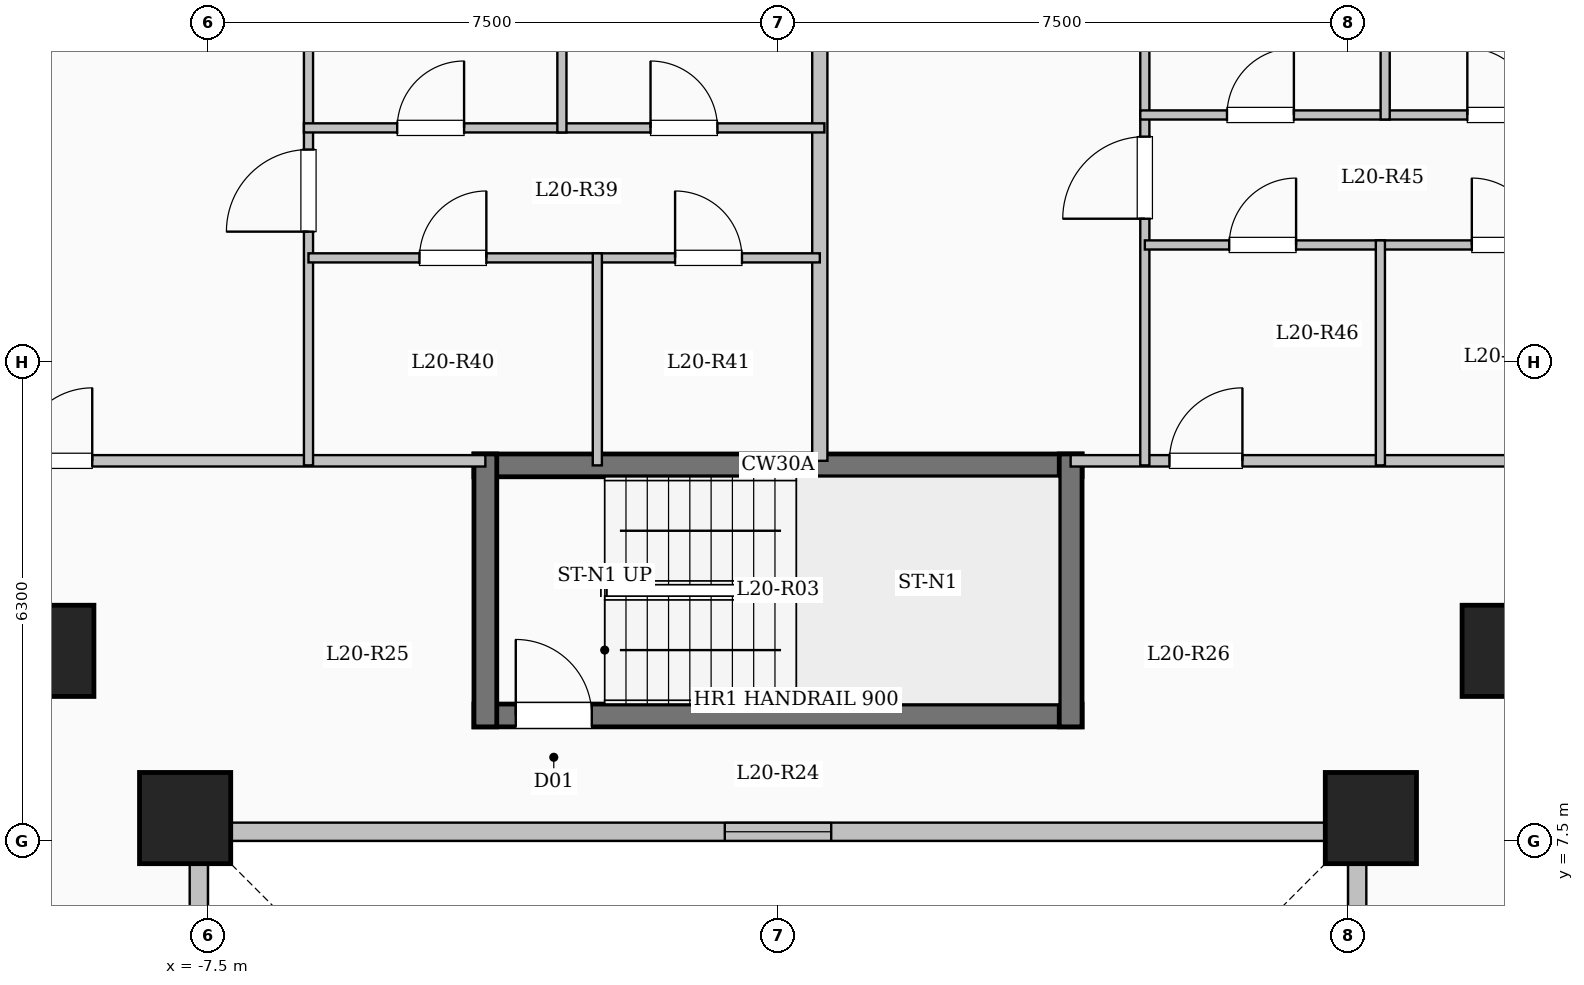
"""IFC4 building model, lengths in metres.
Left out: names, types, materials, properties, quantities, classifications, styles, units other than length and angle.
Written with IfcOpenShell. Run it as: python <this file> out.ifc"""

import sys

from ifc_helpers import new_model, si_unit, direction, frame, frame_2d, origin, origin_2d, place, context, subcontext, project, spatial, rectangle, extrude, element, fill, save


model = new_model("IFC4")
c1 = context("Model", 3, precision=1e-05, world=origin(), true_north=direction((0.0, 1.0)))
c2 = subcontext(c1, "Body", "Model", "MODEL_VIEW")
j1 = project(units=[si_unit("LENGTHUNIT", "METRE"), si_unit("PLANEANGLEUNIT", "RADIAN")], contexts=[c1])
p1 = place(None, origin())
s1 = spatial("IfcSite", under=j1, at=p1, CompositionType="ELEMENT")
p2 = place(p1, origin())
s2 = spatial("IfcBuilding", under=s1, at=p2, CompositionType="ELEMENT")
p3 = place(p2, frame((0.0, 0.0, 78.3)))
s3 = spatial("IfcBuildingStorey", under=s2, at=p3, CompositionType="ELEMENT", Elevation=78.3)
for number, where, z_axis, x_axis in (
    (1, (-7.8, 7.8, 0.0), (0.0, 0.0, 1.0), (1.0, 0.0, 0.0)),
    (2, (7.8, 7.8, 0.0), (0.0, 0.0, 1.0), (1.0, 0.0, 0.0)),
    (3, (-9.6, 10.0, 0.0), (0.0, 0.0, 1.0), (1.0, 0.0, 0.0)),
    (4, (9.6, 10.0, 0.0), (0.0, 0.0, 1.0), (1.0, 0.0, 0.0)),
):
    element("IfcColumn", number, at=place(p3, frame(where, z_axis=z_axis, x_axis=x_axis)), inside=s3, PredefinedType="COLUMN", context=c2, shape_type="SweptSolid", body=[
        extrude(rectangle(XDim=1.2, YDim=1.2, at=origin_2d()), origin(), (0.0, 0.0, 1.0), 3.35),
    ])
p4 = place(p3, frame((7.62, -7.62, 0.0), z_axis=(0.0, 0.0, 1.0), x_axis=(0.0, 1.0, 0.0)))
e5 = element("IfcWall", 5, at=p4, inside=s3, PredefinedType="SOLIDWALL", context=c2, shape_type="SweptSolid", body=[
    extrude(rectangle(XDim=15.24, YDim=0.24, at=frame_2d((7.62, 0.0))), origin(), (0.0, 0.0, 1.0), 3.1),
])
p5 = place(p4, frame((6.92, 0.0, 0.95)))
e6 = element("IfcOpeningElement", 6, at=p5, cuts=e5, PredefinedType="OPENING", context=c2, shape_type="SweptSolid", body=[
    extrude(rectangle(XDim=1.4, YDim=1.5, at=frame_2d((0.7, 0.75))), frame((0.0, 0.13, 0.0), z_axis=(0.0, -1.0, 0.0), x_axis=(1.0, 0.0, 0.0)), (0.0, 0.0, 1.0), 0.26),
])
p6 = place(p3, frame((7.62, 7.62, 0.0), z_axis=(0.0, 0.0, 1.0), x_axis=(-1.0, 0.0, 0.0)))
e7 = element("IfcWall", 7, at=p6, inside=s3, PredefinedType="SOLIDWALL", context=c2, shape_type="SweptSolid", body=[
    extrude(rectangle(XDim=15.24, YDim=0.24, at=frame_2d((7.62, 0.0))), origin(), (0.0, 0.0, 1.0), 3.1),
])
p7 = place(p6, frame((6.92, 0.0, 0.95)))
e8 = element("IfcOpeningElement", 8, at=p7, cuts=e7, PredefinedType="OPENING", context=c2, shape_type="SweptSolid", body=[
    extrude(rectangle(XDim=1.4, YDim=1.5, at=frame_2d((0.7, 0.75))), frame((0.0, 0.13, 0.0), z_axis=(0.0, -1.0, 0.0), x_axis=(1.0, 0.0, 0.0)), (0.0, 0.0, 1.0), 0.26),
])
p8 = place(p3, frame((-7.62, 7.62, 0.0), z_axis=(0.0, 0.0, 1.0), x_axis=(0.0, -1.0, 0.0)))
e9 = element("IfcWall", 9, at=p8, inside=s3, PredefinedType="SOLIDWALL", context=c2, shape_type="SweptSolid", body=[
    extrude(rectangle(XDim=15.24, YDim=0.24, at=frame_2d((7.62, 0.0))), origin(), (0.0, 0.0, 1.0), 3.1),
])
p9 = place(p8, frame((6.92, 0.0, 0.95)))
e10 = element("IfcOpeningElement", 10, at=p9, cuts=e9, PredefinedType="OPENING", context=c2, shape_type="SweptSolid", body=[
    extrude(rectangle(XDim=1.4, YDim=1.5, at=frame_2d((0.7, 0.75))), frame((0.0, 0.13, 0.0), z_axis=(0.0, -1.0, 0.0), x_axis=(1.0, 0.0, 0.0)), (0.0, 0.0, 1.0), 0.26),
])
p10 = place(p3, frame((-4.0, 12.44, 0.0), z_axis=(0.0, 0.0, 1.0), x_axis=(1.0, 0.0, 0.0)))
e11 = element("IfcWall", 11, at=p10, inside=s3, PredefinedType="SHEAR", context=c2, shape_type="SweptSolid", body=[
    extrude(rectangle(XDim=8.0, YDim=0.3, at=frame_2d((4.0, 0.0))), origin(), (0.0, 0.0, 1.0), 3.35),
])
p11 = place(p3, frame((-4.0, 9.15, 0.0), z_axis=(0.0, 0.0, 1.0), x_axis=(1.0, 0.0, 0.0)))
e12 = element("IfcWall", 12, at=p11, inside=s3, PredefinedType="SHEAR", context=c2, shape_type="SweptSolid", body=[
    extrude(rectangle(XDim=8.0, YDim=0.3, at=frame_2d((4.0, 0.0))), origin(), (0.0, 0.0, 1.0), 3.35),
])
p12 = place(p11, frame((0.55, 0.0, 0.0)))
e13 = element("IfcOpeningElement", 13, at=p12, cuts=e12, PredefinedType="OPENING", context=c2, shape_type="SweptSolid", body=[
    extrude(rectangle(XDim=1.0, YDim=2.15, at=frame_2d((0.5, 1.075))), frame((0.0, 0.16, 0.0), z_axis=(0.0, -1.0, 0.0), x_axis=(1.0, 0.0, 0.0)), (0.0, 0.0, 1.0), 0.32),
])
for number, where, z_axis, x_axis in (
    (14, (-3.85, 9.0, 0.0), (0.0, 0.0, 1.0), (0.0, 1.0, 0.0)),
    (15, (3.85, 9.0, 0.0), (0.0, 0.0, 1.0), (0.0, 1.0, 0.0)),
):
    element("IfcWall", number, at=place(p3, frame(where, z_axis=z_axis, x_axis=x_axis)), inside=s3, PredefinedType="SHEAR", context=c2, shape_type="SweptSolid", body=[
        extrude(rectangle(XDim=3.59, YDim=0.3, at=frame_2d((1.795, 0.0))), origin(), (0.0, 0.0, 1.0), 3.35),
    ])
p13 = place(p3, frame((-21.05, 12.5, 0.0), z_axis=(0.0, 0.0, 1.0), x_axis=(1.0, 0.0, 0.0)))
e16 = element("IfcWall", 16, at=p13, inside=s3, PredefinedType="PARTITIONING", context=c2, shape_type="SweptSolid", body=[
    extrude(rectangle(XDim=17.2, YDim=0.15, at=frame_2d((8.6, 0.0))), origin(), (0.0, 0.0, 1.0), 3.1),
])
p14 = place(p13, frame((0.7, 0.0, 0.0)))
e17 = element("IfcOpeningElement", 17, at=p14, cuts=e16, PredefinedType="OPENING", context=c2, shape_type="SweptSolid", body=[
    extrude(rectangle(XDim=0.96, YDim=2.15, at=frame_2d((0.48, 1.075))), frame((0.0, 0.085, 0.0), z_axis=(0.0, -1.0, 0.0), x_axis=(1.0, 0.0, 0.0)), (0.0, 0.0, 1.0), 0.17),
])
p15 = place(p13, frame((11.068, 0.0, 0.0)))
e18 = element("IfcOpeningElement", 18, at=p15, cuts=e16, PredefinedType="OPENING", context=c2, shape_type="SweptSolid", body=[
    extrude(rectangle(XDim=0.96, YDim=2.15, at=frame_2d((0.48, 1.075))), frame((0.0, 0.085, 0.0), z_axis=(0.0, -1.0, 0.0), x_axis=(1.0, 0.0, 0.0)), (0.0, 0.0, 1.0), 0.17),
])
p16 = place(p3, frame((3.85, 12.5, 0.0), z_axis=(0.0, 0.0, 1.0), x_axis=(1.0, 0.0, 0.0)))
e19 = element("IfcWall", 19, at=p16, inside=s3, PredefinedType="PARTITIONING", context=c2, shape_type="SweptSolid", body=[
    extrude(rectangle(XDim=17.2, YDim=0.15, at=frame_2d((8.6, 0.0))), origin(), (0.0, 0.0, 1.0), 3.1),
])
p17 = place(p16, frame((1.3, 0.0, 0.0)))
e20 = element("IfcOpeningElement", 20, at=p17, cuts=e19, PredefinedType="OPENING", context=c2, shape_type="SweptSolid", body=[
    extrude(rectangle(XDim=0.96, YDim=2.15, at=frame_2d((0.48, 1.075))), frame((0.0, 0.085, 0.0), z_axis=(0.0, -1.0, 0.0), x_axis=(1.0, 0.0, 0.0)), (0.0, 0.0, 1.0), 0.17),
])
p18 = place(p16, frame((8.06, 0.0, 0.0)))
e21 = element("IfcOpeningElement", 21, at=p18, cuts=e19, PredefinedType="OPENING", context=c2, shape_type="SweptSolid", body=[
    extrude(rectangle(XDim=0.96, YDim=2.15, at=frame_2d((0.48, 1.075))), frame((0.0, 0.085, 0.0), z_axis=(0.0, -1.0, 0.0), x_axis=(1.0, 0.0, 0.0)), (0.0, 0.0, 1.0), 0.17),
])
p19 = place(p3, frame((0.55, 12.5, 0.0), z_axis=(0.0, 0.0, 1.0), x_axis=(0.0, 1.0, 0.0)))
e22 = element("IfcWall", 22, at=p19, inside=s3, PredefinedType="SOLIDWALL", context=c2, shape_type="SweptSolid", body=[
    extrude(rectangle(XDim=11.08, YDim=0.2, at=frame_2d((5.54, 0.0))), origin(), (0.0, 0.0, 1.0), 3.1),
])
p20 = place(p3, frame((-6.177, 12.44, 0.0), z_axis=(0.0, 0.0, 1.0), x_axis=(0.0, 1.0, 0.0)))
e23 = element("IfcWall", 23, at=p20, inside=s3, PredefinedType="PARTITIONING", context=c2, shape_type="SweptSolid", body=[
    extrude(rectangle(XDim=10.85, YDim=0.12, at=frame_2d((5.425, 0.0))), origin(), (0.0, 0.0, 1.0), 3.1),
])
p21 = place(p20, frame((3.075, 0.0, 0.0)))
e24 = element("IfcOpeningElement", 24, at=p21, cuts=e23, PredefinedType="OPENING", context=c2, shape_type="SweptSolid", body=[
    extrude(rectangle(XDim=1.08, YDim=2.15, at=frame_2d((0.54, 1.075))), frame((0.0, 0.07, 0.0), z_axis=(0.0, -1.0, 0.0), x_axis=(1.0, 0.0, 0.0)), (0.0, 0.0, 1.0), 0.14),
])
p22 = place(p3, frame((-6.177, 15.17, 0.0), z_axis=(0.0, 0.0, 1.0), x_axis=(1.0, 0.0, 0.0)))
e25 = element("IfcWall", 25, at=p22, inside=s3, PredefinedType="PARTITIONING", context=c2, shape_type="SweptSolid", body=[
    extrude(rectangle(XDim=3.8, YDim=0.12, at=frame_2d((1.9, 0.0))), origin(), (0.0, 0.0, 1.0), 3.1),
])
p23 = place(p22, frame((1.46, 0.0, 0.0)))
e26 = element("IfcOpeningElement", 26, at=p23, cuts=e25, PredefinedType="OPENING", context=c2, shape_type="SweptSolid", body=[
    extrude(rectangle(XDim=0.88, YDim=2.1, at=frame_2d((0.44, 1.05))), frame((0.0, 0.07, 0.0), z_axis=(0.0, -1.0, 0.0), x_axis=(1.0, 0.0, 0.0)), (0.0, 0.0, 1.0), 0.14),
])
p24 = place(p3, frame((-2.377, 15.17, 0.0), z_axis=(0.0, 0.0, 1.0), x_axis=(1.0, 0.0, 0.0)))
e27 = element("IfcWall", 27, at=p24, inside=s3, PredefinedType="PARTITIONING", context=c2, shape_type="SweptSolid", body=[
    extrude(rectangle(XDim=2.927, YDim=0.12, at=frame_2d((1.463, 0.0))), origin(), (0.0, 0.0, 1.0), 3.1),
])
p25 = place(p24, frame((1.023, 0.0, 0.0)))
e28 = element("IfcOpeningElement", 28, at=p25, cuts=e27, PredefinedType="OPENING", context=c2, shape_type="SweptSolid", body=[
    extrude(rectangle(XDim=0.88, YDim=2.1, at=frame_2d((0.44, 1.05))), frame((0.0, 0.07, 0.0), z_axis=(0.0, -1.0, 0.0), x_axis=(1.0, 0.0, 0.0)), (0.0, 0.0, 1.0), 0.14),
])
p26 = place(p3, frame((-6.237, 16.88, 0.0), z_axis=(0.0, 0.0, 1.0), x_axis=(1.0, 0.0, 0.0)))
e29 = element("IfcWall", 29, at=p26, inside=s3, PredefinedType="PARTITIONING", context=c2, shape_type="SweptSolid", body=[
    extrude(rectangle(XDim=6.847, YDim=0.12, at=frame_2d((3.424, 0.0))), origin(), (0.0, 0.0, 1.0), 3.1),
])
p27 = place(p26, frame((1.227, 0.0, 0.0)))
e30 = element("IfcOpeningElement", 30, at=p27, cuts=e29, PredefinedType="OPENING", context=c2, shape_type="SweptSolid", body=[
    extrude(rectangle(XDim=0.88, YDim=2.1, at=frame_2d((0.44, 1.05))), frame((0.0, 0.07, 0.0), z_axis=(0.0, -1.0, 0.0), x_axis=(1.0, 0.0, 0.0)), (0.0, 0.0, 1.0), 0.14),
])
p28 = place(p26, frame((4.56, 0.0, 0.0)))
e31 = element("IfcOpeningElement", 31, at=p28, cuts=e29, PredefinedType="OPENING", context=c2, shape_type="SweptSolid", body=[
    extrude(rectangle(XDim=0.88, YDim=2.1, at=frame_2d((0.44, 1.05))), frame((0.0, 0.07, 0.0), z_axis=(0.0, -1.0, 0.0), x_axis=(1.0, 0.0, 0.0)), (0.0, 0.0, 1.0), 0.14),
])
p29 = place(p3, frame((-2.377, 12.44, 0.0), z_axis=(0.0, 0.0, 1.0), x_axis=(0.0, 1.0, 0.0)))
e32 = element("IfcWall", 32, at=p29, inside=s3, PredefinedType="PARTITIONING", context=c2, shape_type="SweptSolid", body=[
    extrude(rectangle(XDim=2.79, YDim=0.12, at=frame_2d((1.395, 0.0))), origin(), (0.0, 0.0, 1.0), 3.1),
])
p30 = place(p3, frame((-2.843, 16.82, 0.0), z_axis=(0.0, 0.0, 1.0), x_axis=(0.0, 1.0, 0.0)))
e33 = element("IfcWall", 33, at=p30, inside=s3, PredefinedType="PARTITIONING", context=c2, shape_type="SweptSolid", body=[
    extrude(rectangle(XDim=6.76, YDim=0.12, at=frame_2d((3.38, 0.0))), origin(), (0.0, 0.0, 1.0), 3.1),
])
p31 = place(p3, frame((4.826, 12.44, 0.0), z_axis=(0.0, 0.0, 1.0), x_axis=(0.0, 1.0, 0.0)))
e34 = element("IfcWall", 34, at=p31, inside=s3, PredefinedType="PARTITIONING", context=c2, shape_type="SweptSolid", body=[
    extrude(rectangle(XDim=11.14, YDim=0.12, at=frame_2d((5.57, 0.0))), origin(), (0.0, 0.0, 1.0), 3.1),
])
p32 = place(p31, frame((3.245, 0.0, 0.0)))
e35 = element("IfcOpeningElement", 35, at=p32, cuts=e34, PredefinedType="OPENING", context=c2, shape_type="SweptSolid", body=[
    extrude(rectangle(XDim=1.08, YDim=2.15, at=frame_2d((0.54, 1.075))), frame((0.0, 0.07, 0.0), z_axis=(0.0, -1.0, 0.0), x_axis=(1.0, 0.0, 0.0)), (0.0, 0.0, 1.0), 0.14),
])
p33 = place(p3, frame((4.826, 15.34, 0.0), z_axis=(0.0, 0.0, 1.0), x_axis=(1.0, 0.0, 0.0)))
e36 = element("IfcWall", 36, at=p33, inside=s3, PredefinedType="PARTITIONING", context=c2, shape_type="SweptSolid", body=[
    extrude(rectangle(XDim=3.099, YDim=0.12, at=frame_2d((1.55, 0.0))), origin(), (0.0, 0.0, 1.0), 3.1),
])
p34 = place(p33, frame((1.11, 0.0, 0.0)))
e37 = element("IfcOpeningElement", 37, at=p34, cuts=e36, PredefinedType="OPENING", context=c2, shape_type="SweptSolid", body=[
    extrude(rectangle(XDim=0.88, YDim=2.1, at=frame_2d((0.44, 1.05))), frame((0.0, 0.07, 0.0), z_axis=(0.0, -1.0, 0.0), x_axis=(1.0, 0.0, 0.0)), (0.0, 0.0, 1.0), 0.14),
])
p35 = place(p3, frame((7.925, 15.34, 0.0), z_axis=(0.0, 0.0, 1.0), x_axis=(1.0, 0.0, 0.0)))
e38 = element("IfcWall", 38, at=p35, inside=s3, PredefinedType="PARTITIONING", context=c2, shape_type="SweptSolid", body=[
    extrude(rectangle(XDim=3.285, YDim=0.12, at=frame_2d((1.643, 0.0))), origin(), (0.0, 0.0, 1.0), 3.1),
])
p36 = place(p35, frame((1.203, 0.0, 0.0)))
e39 = element("IfcOpeningElement", 39, at=p36, cuts=e38, PredefinedType="OPENING", context=c2, shape_type="SweptSolid", body=[
    extrude(rectangle(XDim=0.88, YDim=2.1, at=frame_2d((0.44, 1.05))), frame((0.0, 0.07, 0.0), z_axis=(0.0, -1.0, 0.0), x_axis=(1.0, 0.0, 0.0)), (0.0, 0.0, 1.0), 0.14),
])
p37 = place(p3, frame((4.766, 17.05, 0.0), z_axis=(0.0, 0.0, 1.0), x_axis=(1.0, 0.0, 0.0)))
e40 = element("IfcWall", 40, at=p37, inside=s3, PredefinedType="PARTITIONING", context=c2, shape_type="SweptSolid", body=[
    extrude(rectangle(XDim=6.504, YDim=0.12, at=frame_2d((3.252, 0.0))), origin(), (0.0, 0.0, 1.0), 3.1),
])
p38 = place(p37, frame((1.141, 0.0, 0.0)))
e41 = element("IfcOpeningElement", 41, at=p38, cuts=e40, PredefinedType="OPENING", context=c2, shape_type="SweptSolid", body=[
    extrude(rectangle(XDim=0.88, YDim=2.1, at=frame_2d((0.44, 1.05))), frame((0.0, 0.07, 0.0), z_axis=(0.0, -1.0, 0.0), x_axis=(1.0, 0.0, 0.0)), (0.0, 0.0, 1.0), 0.14),
])
p39 = place(p37, frame((4.303, 0.0, 0.0)))
e42 = element("IfcOpeningElement", 42, at=p39, cuts=e40, PredefinedType="OPENING", context=c2, shape_type="SweptSolid", body=[
    extrude(rectangle(XDim=0.88, YDim=2.1, at=frame_2d((0.44, 1.05))), frame((0.0, 0.07, 0.0), z_axis=(0.0, -1.0, 0.0), x_axis=(1.0, 0.0, 0.0)), (0.0, 0.0, 1.0), 0.14),
])
p40 = place(p3, frame((7.925, 12.44, 0.0), z_axis=(0.0, 0.0, 1.0), x_axis=(0.0, 1.0, 0.0)))
e43 = element("IfcWall", 43, at=p40, inside=s3, PredefinedType="PARTITIONING", context=c2, shape_type="SweptSolid", body=[
    extrude(rectangle(XDim=2.96, YDim=0.12, at=frame_2d((1.48, 0.0))), origin(), (0.0, 0.0, 1.0), 2.435),
])
p41 = place(p3, frame((7.988, 16.99, 0.0), z_axis=(0.0, 0.0, 1.0), x_axis=(0.0, 1.0, 0.0)))
e44 = element("IfcWall", 44, at=p41, inside=s3, PredefinedType="PARTITIONING", context=c2, shape_type="SweptSolid", body=[
    extrude(rectangle(XDim=5.853, YDim=0.12, at=frame_2d((2.927, 0.0))), origin(), (0.0, 0.0, 1.0), 2.435),
])
p42 = place(p7, origin())
e45 = element("IfcWindow", 45, at=p42, inside=s3, PartitioningType="SINGLE_PANEL", PredefinedType="WINDOW", context=c2, shape_type="SweptSolid", body=[
    extrude(rectangle(XDim=1.4, YDim=1.5, at=frame_2d((0.7, 0.75))), frame((0.0, 0.03, 0.0), z_axis=(0.0, -1.0, 0.0), x_axis=(1.0, 0.0, 0.0)), (0.0, 0.0, 1.0), 0.06),
])
fill(e8, e45)
p43 = place(p12, origin())
e46 = element("IfcDoor", 46, at=p43, inside=s3, OperationType="SINGLE_SWING_LEFT", PredefinedType="DOOR", context=c2, shape_type="SweptSolid", body=[
    extrude(rectangle(XDim=1.0, YDim=2.15, at=frame_2d((0.5, 1.075))), frame((0.0, 0.025, 0.0), z_axis=(0.0, -1.0, 0.0), x_axis=(1.0, 0.0, 0.0)), (0.0, 0.0, 1.0), 0.05),
])
fill(e13, e46)
p44 = place(p15, origin())
e47 = element("IfcDoor", 47, at=p44, inside=s3, OperationType="SINGLE_SWING_RIGHT", PredefinedType="DOOR", context=c2, shape_type="SweptSolid", body=[
    extrude(rectangle(XDim=0.96, YDim=2.15, at=frame_2d((0.48, 1.075))), frame((0.0, 0.025, 0.0), z_axis=(0.0, -1.0, 0.0), x_axis=(1.0, 0.0, 0.0)), (0.0, 0.0, 1.0), 0.05),
])
fill(e18, e47)
p45 = place(p21, origin())
e48 = element("IfcDoor", 48, at=p45, inside=s3, OperationType="SINGLE_SWING_LEFT", PredefinedType="DOOR", context=c2, shape_type="SweptSolid", body=[
    extrude(rectangle(XDim=1.08, YDim=2.15, at=frame_2d((0.54, 1.075))), frame((0.0, 0.025, 0.0), z_axis=(0.0, -1.0, 0.0), x_axis=(1.0, 0.0, 0.0)), (0.0, 0.0, 1.0), 0.05),
])
fill(e24, e48)
p46 = place(p23, origin())
e49 = element("IfcDoor", 49, at=p46, inside=s3, OperationType="SINGLE_SWING_RIGHT", PredefinedType="DOOR", context=c2, shape_type="SweptSolid", body=[
    extrude(rectangle(XDim=0.88, YDim=2.1, at=frame_2d((0.44, 1.05))), frame((0.0, 0.025, 0.0), z_axis=(0.0, -1.0, 0.0), x_axis=(1.0, 0.0, 0.0)), (0.0, 0.0, 1.0), 0.05),
])
fill(e26, e49)
p47 = place(p25, origin())
e50 = element("IfcDoor", 50, at=p47, inside=s3, OperationType="SINGLE_SWING_LEFT", PredefinedType="DOOR", context=c2, shape_type="SweptSolid", body=[
    extrude(rectangle(XDim=0.88, YDim=2.1, at=frame_2d((0.44, 1.05))), frame((0.0, 0.025, 0.0), z_axis=(0.0, -1.0, 0.0), x_axis=(1.0, 0.0, 0.0)), (0.0, 0.0, 1.0), 0.05),
])
fill(e28, e50)
p48 = place(p27, origin())
e51 = element("IfcDoor", 51, at=p48, inside=s3, OperationType="SINGLE_SWING_RIGHT", PredefinedType="DOOR", context=c2, shape_type="SweptSolid", body=[
    extrude(rectangle(XDim=0.88, YDim=2.1, at=frame_2d((0.44, 1.05))), frame((0.0, 0.025, 0.0), z_axis=(0.0, -1.0, 0.0), x_axis=(1.0, 0.0, 0.0)), (0.0, 0.0, 1.0), 0.05),
])
fill(e30, e51)
p49 = place(p28, origin())
e52 = element("IfcDoor", 52, at=p49, inside=s3, OperationType="SINGLE_SWING_LEFT", PredefinedType="DOOR", context=c2, shape_type="SweptSolid", body=[
    extrude(rectangle(XDim=0.88, YDim=2.1, at=frame_2d((0.44, 1.05))), frame((0.0, 0.025, 0.0), z_axis=(0.0, -1.0, 0.0), x_axis=(1.0, 0.0, 0.0)), (0.0, 0.0, 1.0), 0.05),
])
fill(e31, e52)
p50 = place(p17, origin())
e53 = element("IfcDoor", 53, at=p50, inside=s3, OperationType="SINGLE_SWING_RIGHT", PredefinedType="DOOR", context=c2, shape_type="SweptSolid", body=[
    extrude(rectangle(XDim=0.96, YDim=2.15, at=frame_2d((0.48, 1.075))), frame((0.0, 0.025, 0.0), z_axis=(0.0, -1.0, 0.0), x_axis=(1.0, 0.0, 0.0)), (0.0, 0.0, 1.0), 0.05),
])
fill(e20, e53)
p51 = place(p32, origin())
e54 = element("IfcDoor", 54, at=p51, inside=s3, OperationType="SINGLE_SWING_LEFT", PredefinedType="DOOR", context=c2, shape_type="SweptSolid", body=[
    extrude(rectangle(XDim=1.08, YDim=2.15, at=frame_2d((0.54, 1.075))), frame((0.0, 0.025, 0.0), z_axis=(0.0, -1.0, 0.0), x_axis=(1.0, 0.0, 0.0)), (0.0, 0.0, 1.0), 0.05),
])
fill(e35, e54)
p52 = place(p34, origin())
e55 = element("IfcDoor", 55, at=p52, inside=s3, OperationType="SINGLE_SWING_RIGHT", PredefinedType="DOOR", context=c2, shape_type="SweptSolid", body=[
    extrude(rectangle(XDim=0.88, YDim=2.1, at=frame_2d((0.44, 1.05))), frame((0.0, 0.025, 0.0), z_axis=(0.0, -1.0, 0.0), x_axis=(1.0, 0.0, 0.0)), (0.0, 0.0, 1.0), 0.05),
])
fill(e37, e55)
p53 = place(p36, origin())
e56 = element("IfcDoor", 56, at=p53, inside=s3, OperationType="SINGLE_SWING_LEFT", PredefinedType="DOOR", context=c2, shape_type="SweptSolid", body=[
    extrude(rectangle(XDim=0.88, YDim=2.1, at=frame_2d((0.44, 1.05))), frame((0.0, 0.025, 0.0), z_axis=(0.0, -1.0, 0.0), x_axis=(1.0, 0.0, 0.0)), (0.0, 0.0, 1.0), 0.05),
])
fill(e39, e56)
p54 = place(p38, origin())
e57 = element("IfcDoor", 57, at=p54, inside=s3, OperationType="SINGLE_SWING_RIGHT", PredefinedType="DOOR", context=c2, shape_type="SweptSolid", body=[
    extrude(rectangle(XDim=0.88, YDim=2.1, at=frame_2d((0.44, 1.05))), frame((0.0, 0.025, 0.0), z_axis=(0.0, -1.0, 0.0), x_axis=(1.0, 0.0, 0.0)), (0.0, 0.0, 1.0), 0.05),
])
fill(e41, e57)
p55 = place(p39, origin())
e58 = element("IfcDoor", 58, at=p55, inside=s3, OperationType="SINGLE_SWING_LEFT", PredefinedType="DOOR", context=c2, shape_type="SweptSolid", body=[
    extrude(rectangle(XDim=0.88, YDim=2.1, at=frame_2d((0.44, 1.05))), frame((0.0, 0.025, 0.0), z_axis=(0.0, -1.0, 0.0), x_axis=(1.0, 0.0, 0.0)), (0.0, 0.0, 1.0), 0.05),
])
fill(e42, e58)
save(model, sys.argv[1])
